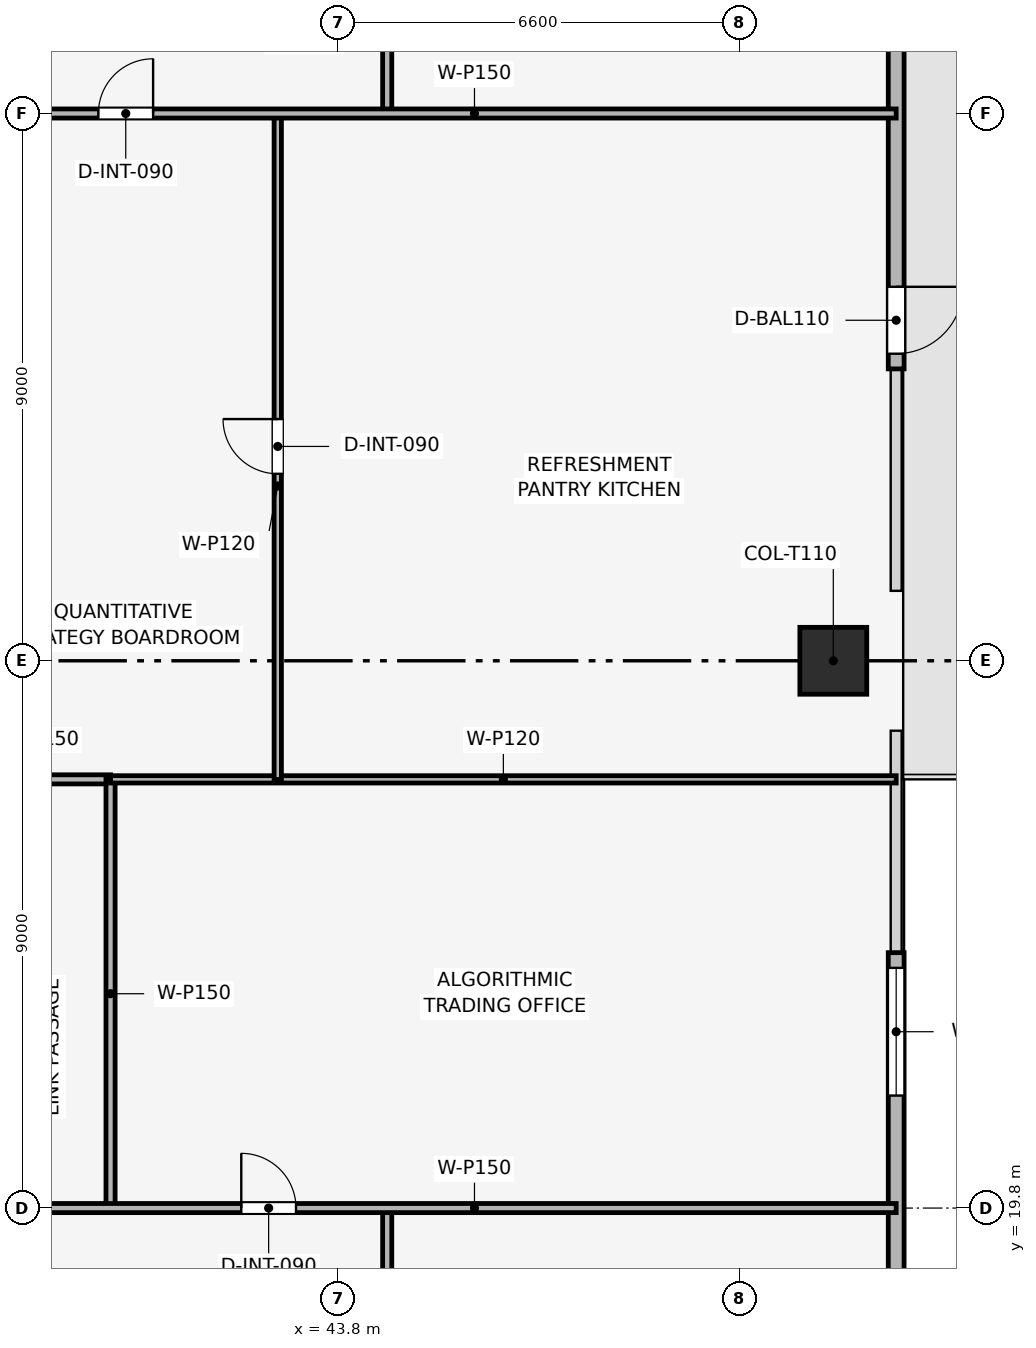
"""IFC4 building model, lengths in metres.
Left out: names, types, materials, properties, quantities, classifications, styles, units other than length and angle.
Written with IfcOpenShell. Run it as: python <this file> out.ifc"""

import sys

from ifc_helpers import new_model, si_unit, direction, frame, frame_2d, origin, origin_2d, place, context, subcontext, project, spatial, rectangle, extrude, element, fill, save


model = new_model("IFC4")
c1 = context("Model", 3, precision=1e-05, world=origin(), true_north=direction((0.0, 1.0)))
c2 = subcontext(c1, "Body", "Model", "MODEL_VIEW")
j1 = project(units=[si_unit("LENGTHUNIT", "METRE"), si_unit("PLANEANGLEUNIT", "RADIAN")], contexts=[c1])
p1 = place(None, origin())
s1 = spatial("IfcSite", under=j1, at=p1, CompositionType="ELEMENT")
p2 = place(p1, origin())
s2 = spatial("IfcBuilding", under=s1, at=p2, CompositionType="ELEMENT")
p3 = place(p2, frame((0.0, 0.0, 190.8)))
s3 = spatial("IfcBuildingStorey", under=s2, at=p3, CompositionType="ELEMENT", Elevation=190.8)
p4 = place(p3, frame((51.936, 28.8, 0.089), z_axis=(0.371258345829, 0.0, 0.928529612157), x_axis=(0.0, 1.0, 0.0)))
e1 = element("IfcColumn", 1, at=p4, inside=s3, PredefinedType="COLUMN", context=c2, shape_type="SweptSolid", body=[
    extrude(rectangle(XDim=1.1, YDim=1.1, at=origin_2d()), origin(), (0.0, 0.0, 1.0), 3.499),
])
p5 = place(p3, frame((52.97, 46.2, 0.0), z_axis=(0.0, 0.0, 1.0), x_axis=(0.0, -1.0, 0.0)))
e2 = element("IfcWall", 2, at=p5, inside=s3, PredefinedType="SOLIDWALL", context=c2, shape_type="SweptSolid", body=[
    extrude(rectangle(XDim=12.6, YDim=0.26, at=frame_2d((6.3, 0.0))), origin(), (0.0, 0.0, 1.0), 3.35),
])
p6 = place(p5, frame((11.25, 0.0, 0.0)))
e3 = element("IfcOpeningElement", 3, at=p6, cuts=e2, PredefinedType="OPENING", context=c2, shape_type="SweptSolid", body=[
    extrude(rectangle(XDim=1.1, YDim=2.2, at=frame_2d((0.55, 1.1))), frame((0.0, 0.14, 0.0), z_axis=(0.0, -1.0, 0.0), x_axis=(1.0, 0.0, 0.0)), (0.0, 0.0, 1.0), 0.28),
])
p7 = place(p3, frame((52.97, 24.0, 0.0), z_axis=(0.0, 0.0, 1.0), x_axis=(0.0, -1.0, 0.0)))
e4 = element("IfcWall", 4, at=p7, inside=s3, PredefinedType="SOLIDWALL", context=c2, shape_type="SweptSolid", body=[
    extrude(rectangle(XDim=12.6, YDim=0.26, at=frame_2d((6.3, 0.0))), origin(), (0.0, 0.0, 1.0), 3.35),
])
p8 = place(p7, frame((0.25, 0.0, 0.72)))
e5 = element("IfcOpeningElement", 5, at=p8, cuts=e4, PredefinedType="OPENING", context=c2, shape_type="SweptSolid", body=[
    extrude(rectangle(XDim=2.1, YDim=2.1, at=frame_2d((1.05, 1.05))), frame((0.0, 0.14, 0.0), z_axis=(0.0, -1.0, 0.0), x_axis=(1.0, 0.0, 0.0)), (0.0, 0.0, 1.0), 0.28),
])
p9 = place(p3, frame((37.8, 26.85, 0.0), z_axis=(0.0, 0.0, 1.0), x_axis=(1.0, 0.0, 0.0)))
e6 = element("IfcWall", 6, at=p9, inside=s3, PredefinedType="PARTITIONING", context=c2, shape_type="SweptSolid", body=[
    extrude(rectangle(XDim=2.25, YDim=0.15, at=frame_2d((1.125, 0.0))), origin(), (0.0, 0.0, 1.0), 3.35),
])
p10 = place(p3, frame((40.05, 19.8, 0.0), z_axis=(0.0, 0.0, 1.0), x_axis=(0.0, 1.0, 0.0)))
e7 = element("IfcWall", 7, at=p10, inside=s3, PredefinedType="PARTITIONING", context=c2, shape_type="SweptSolid", body=[
    extrude(rectangle(XDim=7.05, YDim=0.15, at=frame_2d((3.525, 0.0))), origin(), (0.0, 0.0, 1.0), 2.885),
])
p11 = place(p3, frame((40.05, 26.85, 0.0), z_axis=(0.0, 0.0, 1.0), x_axis=(1.0, 0.0, 0.0)))
e8 = element("IfcWall", 8, at=p11, inside=s3, PredefinedType="PARTITIONING", context=c2, shape_type="SweptSolid", body=[
    extrude(rectangle(XDim=12.92, YDim=0.12, at=frame_2d((6.46, 0.0))), origin(), (0.0, 0.0, 1.0), 2.835),
])
p12 = place(p3, frame((42.8, 26.85, 0.0), z_axis=(0.0, 0.0, 1.0), x_axis=(0.0, 1.0, 0.0)))
e9 = element("IfcWall", 9, at=p12, inside=s3, PredefinedType="PARTITIONING", context=c2, shape_type="SweptSolid", body=[
    extrude(rectangle(XDim=10.95, YDim=0.12, at=frame_2d((5.475, 0.0))), origin(), (0.0, 0.0, 1.0), 2.885),
])
p13 = place(p12, frame((5.025, 0.0, 0.0)))
e10 = element("IfcOpeningElement", 10, at=p13, cuts=e9, PredefinedType="OPENING", context=c2, shape_type="SweptSolid", body=[
    extrude(rectangle(XDim=0.9, YDim=2.1, at=frame_2d((0.45, 1.05))), frame((0.0, 0.07, 0.0), z_axis=(0.0, -1.0, 0.0), x_axis=(1.0, 0.0, 0.0)), (0.0, 0.0, 1.0), 0.14),
])
p14 = place(p3, frame((44.6, 17.4, 0.0), z_axis=(0.0, 0.0, 1.0), x_axis=(0.0, 1.0, 0.0)))
e11 = element("IfcWall", 11, at=p14, inside=s3, PredefinedType="PARTITIONING", context=c2, shape_type="SweptSolid", body=[
    extrude(rectangle(XDim=2.4, YDim=0.15, at=frame_2d((1.2, 0.0))), origin(), (0.0, 0.0, 1.0), 3.35),
])
p15 = place(p3, frame((44.6, 37.8, 0.0), z_axis=(0.0, 0.0, 1.0), x_axis=(0.0, 1.0, 0.0)))
e12 = element("IfcWall", 12, at=p15, inside=s3, PredefinedType="PARTITIONING", context=c2, shape_type="SweptSolid", body=[
    extrude(rectangle(XDim=2.4, YDim=0.15, at=frame_2d((1.2, 0.0))), origin(), (0.0, 0.0, 1.0), 3.35),
])
p16 = place(p3, frame((37.8, 19.8, 0.0), z_axis=(0.0, 0.0, 1.0), x_axis=(1.0, 0.0, 0.0)))
e13 = element("IfcWall", 13, at=p16, inside=s3, PredefinedType="PARTITIONING", context=c2, shape_type="SweptSolid", body=[
    extrude(rectangle(XDim=15.17, YDim=0.15, at=frame_2d((7.585, 0.0))), origin(), (0.0, 0.0, 1.0), 2.835),
])
p17 = place(p16, frame((4.4, 0.0, 0.0)))
e14 = element("IfcOpeningElement", 14, at=p17, cuts=e13, PredefinedType="OPENING", context=c2, shape_type="SweptSolid", body=[
    extrude(rectangle(XDim=0.9, YDim=2.1, at=frame_2d((0.45, 1.05))), frame((0.0, 0.085, 0.0), z_axis=(0.0, -1.0, 0.0), x_axis=(1.0, 0.0, 0.0)), (0.0, 0.0, 1.0), 0.17),
])
p18 = place(p3, frame((37.8, 37.8, 0.0), z_axis=(0.0, 0.0, 1.0), x_axis=(1.0, 0.0, 0.0)))
e15 = element("IfcWall", 15, at=p18, inside=s3, PredefinedType="PARTITIONING", context=c2, shape_type="SweptSolid", body=[
    extrude(rectangle(XDim=15.17, YDim=0.15, at=frame_2d((7.585, 0.0))), origin(), (0.0, 0.0, 1.0), 2.835),
])
p19 = place(p18, frame((2.05, 0.0, 0.0)))
e16 = element("IfcOpeningElement", 16, at=p19, cuts=e15, PredefinedType="OPENING", context=c2, shape_type="SweptSolid", body=[
    extrude(rectangle(XDim=0.9, YDim=2.1, at=frame_2d((0.45, 1.05))), frame((0.0, 0.085, 0.0), z_axis=(0.0, -1.0, 0.0), x_axis=(1.0, 0.0, 0.0)), (0.0, 0.0, 1.0), 0.17),
])
p20 = place(p6, origin())
e17 = element("IfcDoor", 17, at=p20, inside=s3, OperationType="SINGLE_SWING_LEFT", PredefinedType="DOOR", context=c2, shape_type="SweptSolid", body=[
    extrude(rectangle(XDim=1.1, YDim=2.2, at=frame_2d((0.55, 1.1))), frame((0.0, 0.025, 0.0), z_axis=(0.0, -1.0, 0.0), x_axis=(1.0, 0.0, 0.0)), (0.0, 0.0, 1.0), 0.05),
])
fill(e3, e17)
p21 = place(p8, origin())
e18 = element("IfcWindow", 18, at=p21, inside=s3, PartitioningType="SINGLE_PANEL", PredefinedType="WINDOW", context=c2, shape_type="SweptSolid", body=[
    extrude(rectangle(XDim=2.1, YDim=2.1, at=frame_2d((1.05, 1.05))), frame((0.0, 0.03, 0.0), z_axis=(0.0, -1.0, 0.0), x_axis=(1.0, 0.0, 0.0)), (0.0, 0.0, 1.0), 0.06),
])
fill(e5, e18)
p22 = place(p13, origin())
e19 = element("IfcDoor", 19, at=p22, inside=s3, OperationType="SINGLE_SWING_RIGHT", PredefinedType="DOOR", context=c2, shape_type="SweptSolid", body=[
    extrude(rectangle(XDim=0.9, YDim=2.1, at=frame_2d((0.45, 1.05))), frame((0.0, 0.025, 0.0), z_axis=(0.0, -1.0, 0.0), x_axis=(1.0, 0.0, 0.0)), (0.0, 0.0, 1.0), 0.05),
])
fill(e10, e19)
p23 = place(p17, origin())
e20 = element("IfcDoor", 20, at=p23, inside=s3, OperationType="SINGLE_SWING_LEFT", PredefinedType="DOOR", context=c2, shape_type="SweptSolid", body=[
    extrude(rectangle(XDim=0.9, YDim=2.1, at=frame_2d((0.45, 1.05))), frame((0.0, 0.025, 0.0), z_axis=(0.0, -1.0, 0.0), x_axis=(1.0, 0.0, 0.0)), (0.0, 0.0, 1.0), 0.05),
])
fill(e14, e20)
p24 = place(p19, origin())
e21 = element("IfcDoor", 21, at=p24, inside=s3, OperationType="SINGLE_SWING_RIGHT", PredefinedType="DOOR", context=c2, shape_type="SweptSolid", body=[
    extrude(rectangle(XDim=0.9, YDim=2.1, at=frame_2d((0.45, 1.05))), frame((0.0, 0.025, 0.0), z_axis=(0.0, -1.0, 0.0), x_axis=(1.0, 0.0, 0.0)), (0.0, 0.0, 1.0), 0.05),
])
fill(e16, e21)
save(model, sys.argv[1])
